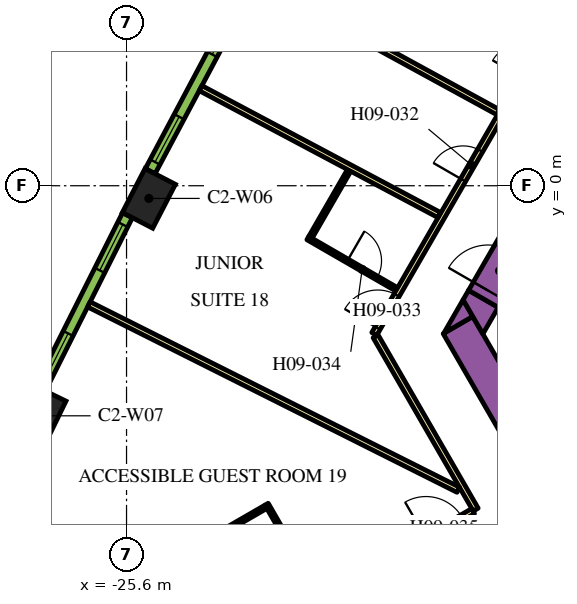
"""IFC4 building model, lengths in metres.
Left out: names, types, materials, properties, quantities, classifications, styles, units other than length and angle.
Written with IfcOpenShell. Run it as: python <this file> out.ifc"""

import sys

from ifc_helpers import new_model, si_unit, direction, frame, frame_2d, origin, origin_2d, place, context, subcontext, project, spatial, polyline, rectangle, outline, extrude, element, fill, save


model = new_model("IFC4")
c1 = context("Model", 3, precision=1e-05, world=origin(), true_north=direction((0.0, 1.0)))
c2 = subcontext(c1, "Body", "Model", "MODEL_VIEW")
j1 = project(units=[si_unit("LENGTHUNIT", "METRE"), si_unit("PLANEANGLEUNIT", "RADIAN")], contexts=[c1])
p1 = place(None, origin())
s1 = spatial("IfcSite", under=j1, at=p1, CompositionType="ELEMENT")
p2 = place(p1, origin())
s2 = spatial("IfcBuilding", under=s1, at=p2, CompositionType="ELEMENT")
p3 = place(p2, frame((0.0, 0.0, 118.8)))
s3 = spatial("IfcBuildingStorey", under=s2, at=p3, CompositionType="ELEMENT", Elevation=118.8)
for number, where, z_axis, x_axis in (
    (1, (-25.012, -0.334, 0.0), (0.0, 0.0, 1.0), (-0.459, -0.888, 0.0)),
    (2, (-27.883, -6.054, 0.0), (0.0, 0.0, 1.0), (-0.438, -0.899, 0.0)),
):
    element("IfcColumn", number, at=place(p3, frame(where, z_axis=z_axis, x_axis=x_axis)), inside=s3, PredefinedType="COLUMN", context=c2, shape_type="SweptSolid", body=[
        extrude(rectangle(XDim=1.3, YDim=0.9, at=origin_2d()), origin(), (0.0, 0.0, 1.0), 3.9),
    ])
p4 = place(p3, frame((-12.134, -11.883, 0.0), z_axis=(0.0, 0.0, 1.0), x_axis=(-0.500005339912, 0.866022320763, 0.0)))
e3 = element("IfcWall", 3, at=p4, inside=s3, PredefinedType="SOLIDWALL", context=c2, shape_type="SweptSolid", body=[
    extrude(rectangle(XDim=9.488, YDim=0.9, at=frame_2d((4.744, 0.0))), origin(), (0.0, 0.0, 1.0), 3.9),
])
p5 = place(p3, origin())
e4 = element("IfcWall", 4, at=p5, inside=s3, PredefinedType="SOLIDWALL", context=c2, shape_type="SweptSolid", body=[
    extrude(outline(polyline([(-16.489, -3.44), (-17.251, -3.88), (-16.743, -3.0), (-16.489, -3.44)])), origin(), (0.0, 0.0, 1.0), 3.9),
])
e5 = element("IfcWall", 5, at=p5, inside=s3, PredefinedType="SOLIDWALL", context=c2, shape_type="SweptSolid", body=[
    extrude(outline(polyline([(-15.82, -3.201), (-16.223, -3.9), (-16.743, -3.0), (-16.599, -2.751), (-15.82, -3.201)])), origin(), (0.0, 0.0, 1.0), 3.9),
])
p6 = place(p3, frame((-16.209, -2.976, 0.0), z_axis=(0.0, 0.0, 1.0), x_axis=(0.499954529098, 0.86605165483, 0.0)))
e6 = element("IfcWall", 6, at=p6, inside=s3, PredefinedType="SOLIDWALL", context=c2, shape_type="SweptSolid", body=[
    extrude(rectangle(XDim=1.7, YDim=0.9, at=frame_2d((0.85, 0.0))), origin(), (0.0, 0.0, 1.0), 3.9),
])
p7 = place(p6, frame((0.25, 0.0, 0.0)))
e7 = element("IfcOpeningElement", 7, at=p7, cuts=e6, PredefinedType="OPENING", context=c2, shape_type="SweptSolid", body=[
    extrude(rectangle(XDim=1.2, YDim=2.1, at=frame_2d((0.6, 1.05))), frame((0.0, 0.46, 0.0), z_axis=(0.0, -1.0, 0.0), x_axis=(1.0, 0.0, 0.0)), (0.0, 0.0, 1.0), 0.92),
])
p8 = place(p3, frame((-19.081, -3.9, 0.0), z_axis=(0.0, 0.0, 1.0), x_axis=(0.499998313975, 0.866026377209, 0.0)))
e8 = element("IfcWall", 8, at=p8, inside=s3, PredefinedType="PARTITIONING", context=c2, shape_type="SweptSolid", body=[
    extrude(rectangle(XDim=25.766, YDim=0.15, at=frame_2d((12.883, 0.0))), origin(), (0.0, 0.0, 1.0), 2.75),
])
p9 = place(p8, frame((19.306, 0.0, 0.0)))
e9 = element("IfcOpeningElement", 9, at=p9, cuts=e8, PredefinedType="OPENING", context=c2, shape_type="SweptSolid", body=[
    extrude(rectangle(XDim=1.0, YDim=2.1, at=frame_2d((0.5, 1.05))), frame((0.0, 0.085, 0.0), z_axis=(0.0, -1.0, 0.0), x_axis=(1.0, 0.0, 0.0)), (0.0, 0.0, 1.0), 0.17),
])
p10 = place(p8, frame((18.0, 0.0, 0.0)))
e10 = element("IfcOpeningElement", 10, at=p10, cuts=e8, PredefinedType="OPENING", context=c2, shape_type="SweptSolid", body=[
    extrude(rectangle(XDim=1.0, YDim=2.1, at=frame_2d((0.5, 1.05))), frame((0.0, 0.085, 0.0), z_axis=(0.0, -1.0, 0.0), x_axis=(1.0, 0.0, 0.0)), (0.0, 0.0, 1.0), 0.17),
])
p11 = place(p8, frame((7.793, 0.0, 0.0)))
e11 = element("IfcOpeningElement", 11, at=p11, cuts=e8, PredefinedType="OPENING", context=c2, shape_type="SweptSolid", body=[
    extrude(rectangle(XDim=0.9, YDim=2.1, at=frame_2d((0.45, 1.05))), frame((0.0, 0.085, 0.0), z_axis=(0.0, -1.0, 0.0), x_axis=(1.0, 0.0, 0.0)), (0.0, 0.0, 1.0), 0.17),
])
p12 = place(p8, frame((4.674, 0.0, 0.0)))
e12 = element("IfcOpeningElement", 12, at=p12, cuts=e8, PredefinedType="OPENING", context=c2, shape_type="SweptSolid", body=[
    extrude(rectangle(XDim=0.9, YDim=2.1, at=frame_2d((0.45, 1.05))), frame((0.0, 0.085, 0.0), z_axis=(0.0, -1.0, 0.0), x_axis=(1.0, 0.0, 0.0)), (0.0, 0.0, 1.0), 0.17),
])
p13 = place(p8, frame((0.18, 0.0, 0.0)))
e13 = element("IfcOpeningElement", 13, at=p13, cuts=e8, PredefinedType="OPENING", context=c2, shape_type="SweptSolid", body=[
    extrude(rectangle(XDim=1.0, YDim=2.1, at=frame_2d((0.5, 1.05))), frame((0.0, 0.085, 0.0), z_axis=(0.0, -1.0, 0.0), x_axis=(1.0, 0.0, 0.0)), (0.0, 0.0, 1.0), 0.17),
])
p14 = place(p3, frame((-16.412, -8.523, 0.0), z_axis=(0.0, 0.0, 1.0), x_axis=(-0.500001929737, 0.866024289647, 0.0)))
e14 = element("IfcWall", 14, at=p14, inside=s3, PredefinedType="PARTITIONING", context=c2, shape_type="SweptSolid", body=[
    extrude(rectangle(XDim=5.268, YDim=0.15, at=frame_2d((2.634, 0.0))), origin(), (0.0, 0.0, 1.0), 2.75),
])
p15 = place(p3, frame((-28.211, -15.335, 0.0), z_axis=(0.0, 0.0, 1.0), x_axis=(0.866025884867, 0.49999916674, 0.0)))
e15 = element("IfcWall", 15, at=p15, inside=s3, PredefinedType="PARTITIONING", context=c2, shape_type="SweptSolid", body=[
    extrude(rectangle(XDim=13.543, YDim=0.15, at=frame_2d((6.772, 0.0))), origin(), (0.0, 0.0, 1.0), 2.75),
])
p16 = place(p15, frame((12.114, 0.0, 0.0)))
e16 = element("IfcOpeningElement", 16, at=p16, cuts=e15, PredefinedType="OPENING", context=c2, shape_type="SweptSolid", body=[
    extrude(rectangle(XDim=1.1, YDim=2.1, at=frame_2d((0.55, 1.05))), frame((0.0, 0.085, 0.0), z_axis=(0.0, -1.0, 0.0), x_axis=(1.0, 0.0, 0.0)), (0.0, 0.0, 1.0), 0.17),
])
p17 = place(p15, frame((4.65, 0.0, 0.0)))
e17 = element("IfcOpeningElement", 17, at=p17, cuts=e15, PredefinedType="OPENING", context=c2, shape_type="SweptSolid", body=[
    extrude(rectangle(XDim=1.0, YDim=2.1, at=frame_2d((0.5, 1.05))), frame((0.0, 0.085, 0.0), z_axis=(0.0, -1.0, 0.0), x_axis=(1.0, 0.0, 0.0)), (0.0, 0.0, 1.0), 0.17),
])
p18 = place(p3, frame((-29.406, -8.901, 0.0), z_axis=(0.0, 0.0, 1.0), x_axis=(0.904002363742, -0.427527456836, 0.0)))
e18 = element("IfcWall", 18, at=p18, inside=s3, PredefinedType="PARTITIONING", context=c2, shape_type="SweptSolid", body=[
    extrude(rectangle(XDim=7.362, YDim=0.15, at=frame_2d((3.681, 0.0))), origin(), (0.0, 0.0, 1.0), 2.75),
])
p19 = place(p3, frame((-23.652, 2.567, 0.0), z_axis=(0.0, 0.0, 1.0), x_axis=(0.883019237957, -0.469336793144, 0.0)))
e19 = element("IfcWall", 19, at=p19, inside=s3, PredefinedType="PARTITIONING", context=c2, shape_type="SweptSolid", body=[
    extrude(rectangle(XDim=7.111, YDim=0.15, at=frame_2d((3.555, 0.0))), origin(), (0.0, 0.0, 1.0), 2.75),
])
p20 = place(p3, frame((-26.591, -3.122, 0.0), z_axis=(0.0, 0.0, 1.0), x_axis=(0.893766213273, -0.448533115847, 0.0)))
e20 = element("IfcWall", 20, at=p20, inside=s3, PredefinedType="PARTITIONING", context=c2, shape_type="SweptSolid", body=[
    extrude(rectangle(XDim=10.875, YDim=0.15, at=frame_2d((5.438, 0.0))), origin(), (0.0, 0.0, 1.0), 2.75),
])
p21 = place(p3, frame((-21.614, 5.102, 0.0), z_axis=(0.0, 0.0, 1.0), x_axis=(0.877484555087, -0.479604895287, 0.0)))
e21 = element("IfcWall", 21, at=p21, inside=s3, PredefinedType="PARTITIONING", context=c2, shape_type="SweptSolid", body=[
    extrude(rectangle(XDim=6.611, YDim=0.15, at=frame_2d((3.306, 0.0))), origin(), (0.0, 0.0, 1.0), 2.75),
])
p22 = place(p3, frame((-20.829, -1.377, 0.0), z_axis=(0.0, 0.0, 1.0), x_axis=(0.866036505625, -0.499980770555, 0.0)))
e22 = element("IfcWall", 22, at=p22, inside=s3, PredefinedType="PARTITIONING", context=c2, shape_type="SweptSolid", body=[
    extrude(rectangle(XDim=2.7, YDim=0.1, at=frame_2d((1.35, 0.0))), origin(), (0.0, 0.0, 1.0), 2.75),
])
p23 = place(p22, frame((1.2, 0.0, 0.0)))
e23 = element("IfcOpeningElement", 23, at=p23, cuts=e22, PredefinedType="OPENING", context=c2, shape_type="SweptSolid", body=[
    extrude(rectangle(XDim=0.9, YDim=2.1, at=frame_2d((0.45, 1.05))), frame((0.0, 0.06, 0.0), z_axis=(0.0, -1.0, 0.0), x_axis=(1.0, 0.0, 0.0)), (0.0, 0.0, 1.0), 0.12),
])
p24 = place(p3, frame((-20.761, -1.359, 0.0), z_axis=(0.0, 0.0, 1.0), x_axis=(0.499954962928, 0.866051404389, 0.0)))
e24 = element("IfcWall", 24, at=p24, inside=s3, PredefinedType="PARTITIONING", context=c2, shape_type="SweptSolid", body=[
    extrude(rectangle(XDim=2.03, YDim=0.1, at=frame_2d((1.015, 0.0))), origin(), (0.0, 0.0, 1.0), 2.75),
])
p25 = place(p3, frame((-20.515, -10.805, 0.0), z_axis=(0.0, 0.0, 1.0), x_axis=(-0.49994636267, 0.866056369097, 0.0)))
e25 = element("IfcWall", 25, at=p25, inside=s3, PredefinedType="PARTITIONING", context=c2, shape_type="SweptSolid", body=[
    extrude(rectangle(XDim=2.8, YDim=0.1, at=frame_2d((1.4, 0.0))), origin(), (0.0, 0.0, 1.0), 2.75),
])
p26 = place(p25, frame((0.55, 0.0, 0.0)))
e26 = element("IfcOpeningElement", 26, at=p26, cuts=e25, PredefinedType="OPENING", context=c2, shape_type="SweptSolid", body=[
    extrude(rectangle(XDim=1.0, YDim=2.1, at=frame_2d((0.5, 1.05))), frame((0.0, 0.06, 0.0), z_axis=(0.0, -1.0, 0.0), x_axis=(1.0, 0.0, 0.0)), (0.0, 0.0, 1.0), 0.12),
])
p27 = place(p3, frame((-21.933, -8.448, 0.0), z_axis=(0.0, 0.0, 1.0), x_axis=(-0.866022959057, -0.500004234368, 0.0)))
e27 = element("IfcWall", 27, at=p27, inside=s3, PredefinedType="PARTITIONING", context=c2, shape_type="SweptSolid", body=[
    extrude(rectangle(XDim=2.5, YDim=0.1, at=frame_2d((1.25, 0.0))), origin(), (0.0, 0.0, 1.0), 2.75),
])
p28 = place(p3, frame((-22.583, 4.887, 0.0), z_axis=(0.0, 0.0, 1.0), x_axis=(-0.469323203119, -0.883026461106, 0.0)))
e28 = element("IfcWall", 28, at=p28, inside=s3, PredefinedType="SOLIDWALL", context=c2, shape_type="SweptSolid", body=[
    extrude(rectangle(XDim=5.101, YDim=0.29, at=frame_2d((2.55, 0.0))), origin(), (0.0, 0.0, 1.0), 3.65),
])
p29 = place(p28, frame((0.273, 0.0, 0.9)))
e29 = element("IfcOpeningElement", 29, at=p29, cuts=e28, PredefinedType="OPENING", context=c2, shape_type="SweptSolid", body=[
    extrude(rectangle(XDim=1.35, YDim=2.15, at=frame_2d((0.675, 1.075))), frame((0.0, 0.155, 0.0), z_axis=(0.0, -1.0, 0.0), x_axis=(1.0, 0.0, 0.0)), (0.0, 0.0, 1.0), 0.31),
])
p30 = place(p28, frame((3.478, 0.0, 0.9)))
e30 = element("IfcOpeningElement", 30, at=p30, cuts=e28, PredefinedType="OPENING", context=c2, shape_type="SweptSolid", body=[
    extrude(rectangle(XDim=1.35, YDim=2.15, at=frame_2d((0.675, 1.075))), frame((0.0, 0.155, 0.0), z_axis=(0.0, -1.0, 0.0), x_axis=(1.0, 0.0, 0.0)), (0.0, 0.0, 1.0), 0.31),
])
p31 = place(p3, frame((-25.576, -0.778, 0.0), z_axis=(0.0, 0.0, 1.0), x_axis=(-0.448534297211, -0.893765620409, 0.0)))
e31 = element("IfcWall", 31, at=p31, inside=s3, PredefinedType="SOLIDWALL", context=c2, shape_type="SweptSolid", body=[
    extrude(rectangle(XDim=5.1, YDim=0.29, at=frame_2d((2.55, 0.0))), origin(), (0.0, 0.0, 1.0), 3.65),
])
p32 = place(p31, frame((0.272, 0.0, 0.9)))
e32 = element("IfcOpeningElement", 32, at=p32, cuts=e31, PredefinedType="OPENING", context=c2, shape_type="SweptSolid", body=[
    extrude(rectangle(XDim=1.35, YDim=2.15, at=frame_2d((0.675, 1.075))), frame((0.0, 0.155, 0.0), z_axis=(0.0, -1.0, 0.0), x_axis=(1.0, 0.0, 0.0)), (0.0, 0.0, 1.0), 0.31),
])
p33 = place(p31, frame((3.478, 0.0, 0.9)))
e33 = element("IfcOpeningElement", 33, at=p33, cuts=e31, PredefinedType="OPENING", context=c2, shape_type="SweptSolid", body=[
    extrude(rectangle(XDim=1.35, YDim=2.15, at=frame_2d((0.675, 1.075))), frame((0.0, 0.155, 0.0), z_axis=(0.0, -1.0, 0.0), x_axis=(1.0, 0.0, 0.0)), (0.0, 0.0, 1.0), 0.31),
])
p34 = place(p7, origin())
e34 = element("IfcDoor", 34, at=p34, inside=s3, OperationType="SINGLE_SWING_LEFT", PredefinedType="DOOR", context=c2, shape_type="SweptSolid", body=[
    extrude(rectangle(XDim=1.2, YDim=2.1, at=frame_2d((0.6, 1.05))), frame((0.0, 0.025, 0.0), z_axis=(0.0, -1.0, 0.0), x_axis=(1.0, 0.0, 0.0)), (0.0, 0.0, 1.0), 0.05),
])
fill(e7, e34)
p35 = place(p12, origin())
e35 = element("IfcDoor", 35, at=p35, inside=s3, OperationType="SINGLE_SWING_LEFT", PredefinedType="DOOR", context=c2, shape_type="SweptSolid", body=[
    extrude(rectangle(XDim=0.9, YDim=2.1, at=frame_2d((0.45, 1.05))), frame((0.0, 0.025, 0.0), z_axis=(0.0, -1.0, 0.0), x_axis=(1.0, 0.0, 0.0)), (0.0, 0.0, 1.0), 0.05),
])
fill(e12, e35)
p36 = place(p13, origin())
e36 = element("IfcDoor", 36, at=p36, inside=s3, OperationType="SINGLE_SWING_LEFT", PredefinedType="DOOR", context=c2, shape_type="SweptSolid", body=[
    extrude(rectangle(XDim=1.0, YDim=2.1, at=frame_2d((0.5, 1.05))), frame((0.0, 0.025, 0.0), z_axis=(0.0, -1.0, 0.0), x_axis=(1.0, 0.0, 0.0)), (0.0, 0.0, 1.0), 0.05),
])
fill(e13, e36)
p37 = place(p23, origin())
e37 = element("IfcDoor", 37, at=p37, inside=s3, OperationType="SINGLE_SWING_RIGHT", PredefinedType="DOOR", context=c2, shape_type="SweptSolid", body=[
    extrude(rectangle(XDim=0.9, YDim=2.1, at=frame_2d((0.45, 1.05))), frame((0.0, 0.025, 0.0), z_axis=(0.0, -1.0, 0.0), x_axis=(1.0, 0.0, 0.0)), (0.0, 0.0, 1.0), 0.05),
])
fill(e23, e37)
p38 = place(p16, origin())
e38 = element("IfcDoor", 38, at=p38, inside=s3, OperationType="SINGLE_SWING_RIGHT", PredefinedType="DOOR", context=c2, shape_type="SweptSolid", body=[
    extrude(rectangle(XDim=1.1, YDim=2.1, at=frame_2d((0.55, 1.05))), frame((0.0, 0.025, 0.0), z_axis=(0.0, -1.0, 0.0), x_axis=(1.0, 0.0, 0.0)), (0.0, 0.0, 1.0), 0.05),
])
fill(e16, e38)
p39 = place(p29, origin())
e39 = element("IfcWindow", 39, at=p39, inside=s3, PartitioningType="DOUBLE_PANEL_VERTICAL", PredefinedType="WINDOW", context=c2, shape_type="SweptSolid", body=[
    extrude(rectangle(XDim=1.35, YDim=2.15, at=frame_2d((0.675, 1.075))), frame((0.0, 0.015, 0.0), z_axis=(0.0, -1.0, 0.0), x_axis=(1.0, 0.0, 0.0)), (0.0, 0.0, 1.0), 0.06),
])
fill(e29, e39)
p40 = place(p30, origin())
e40 = element("IfcWindow", 40, at=p40, inside=s3, PartitioningType="DOUBLE_PANEL_VERTICAL", PredefinedType="WINDOW", context=c2, shape_type="SweptSolid", body=[
    extrude(rectangle(XDim=1.35, YDim=2.15, at=frame_2d((0.675, 1.075))), frame((0.0, 0.015, 0.0), z_axis=(0.0, -1.0, 0.0), x_axis=(1.0, 0.0, 0.0)), (0.0, 0.0, 1.0), 0.06),
])
fill(e30, e40)
p41 = place(p32, origin())
e41 = element("IfcWindow", 41, at=p41, inside=s3, PartitioningType="DOUBLE_PANEL_VERTICAL", PredefinedType="WINDOW", context=c2, shape_type="SweptSolid", body=[
    extrude(rectangle(XDim=1.35, YDim=2.15, at=frame_2d((0.675, 1.075))), frame((0.0, 0.015, 0.0), z_axis=(0.0, -1.0, 0.0), x_axis=(1.0, 0.0, 0.0)), (0.0, 0.0, 1.0), 0.06),
])
fill(e32, e41)
p42 = place(p33, origin())
e42 = element("IfcWindow", 42, at=p42, inside=s3, PartitioningType="DOUBLE_PANEL_VERTICAL", PredefinedType="WINDOW", context=c2, shape_type="SweptSolid", body=[
    extrude(rectangle(XDim=1.35, YDim=2.15, at=frame_2d((0.675, 1.075))), frame((0.0, 0.015, 0.0), z_axis=(0.0, -1.0, 0.0), x_axis=(1.0, 0.0, 0.0)), (0.0, 0.0, 1.0), 0.06),
])
fill(e33, e42)
save(model, sys.argv[1])
